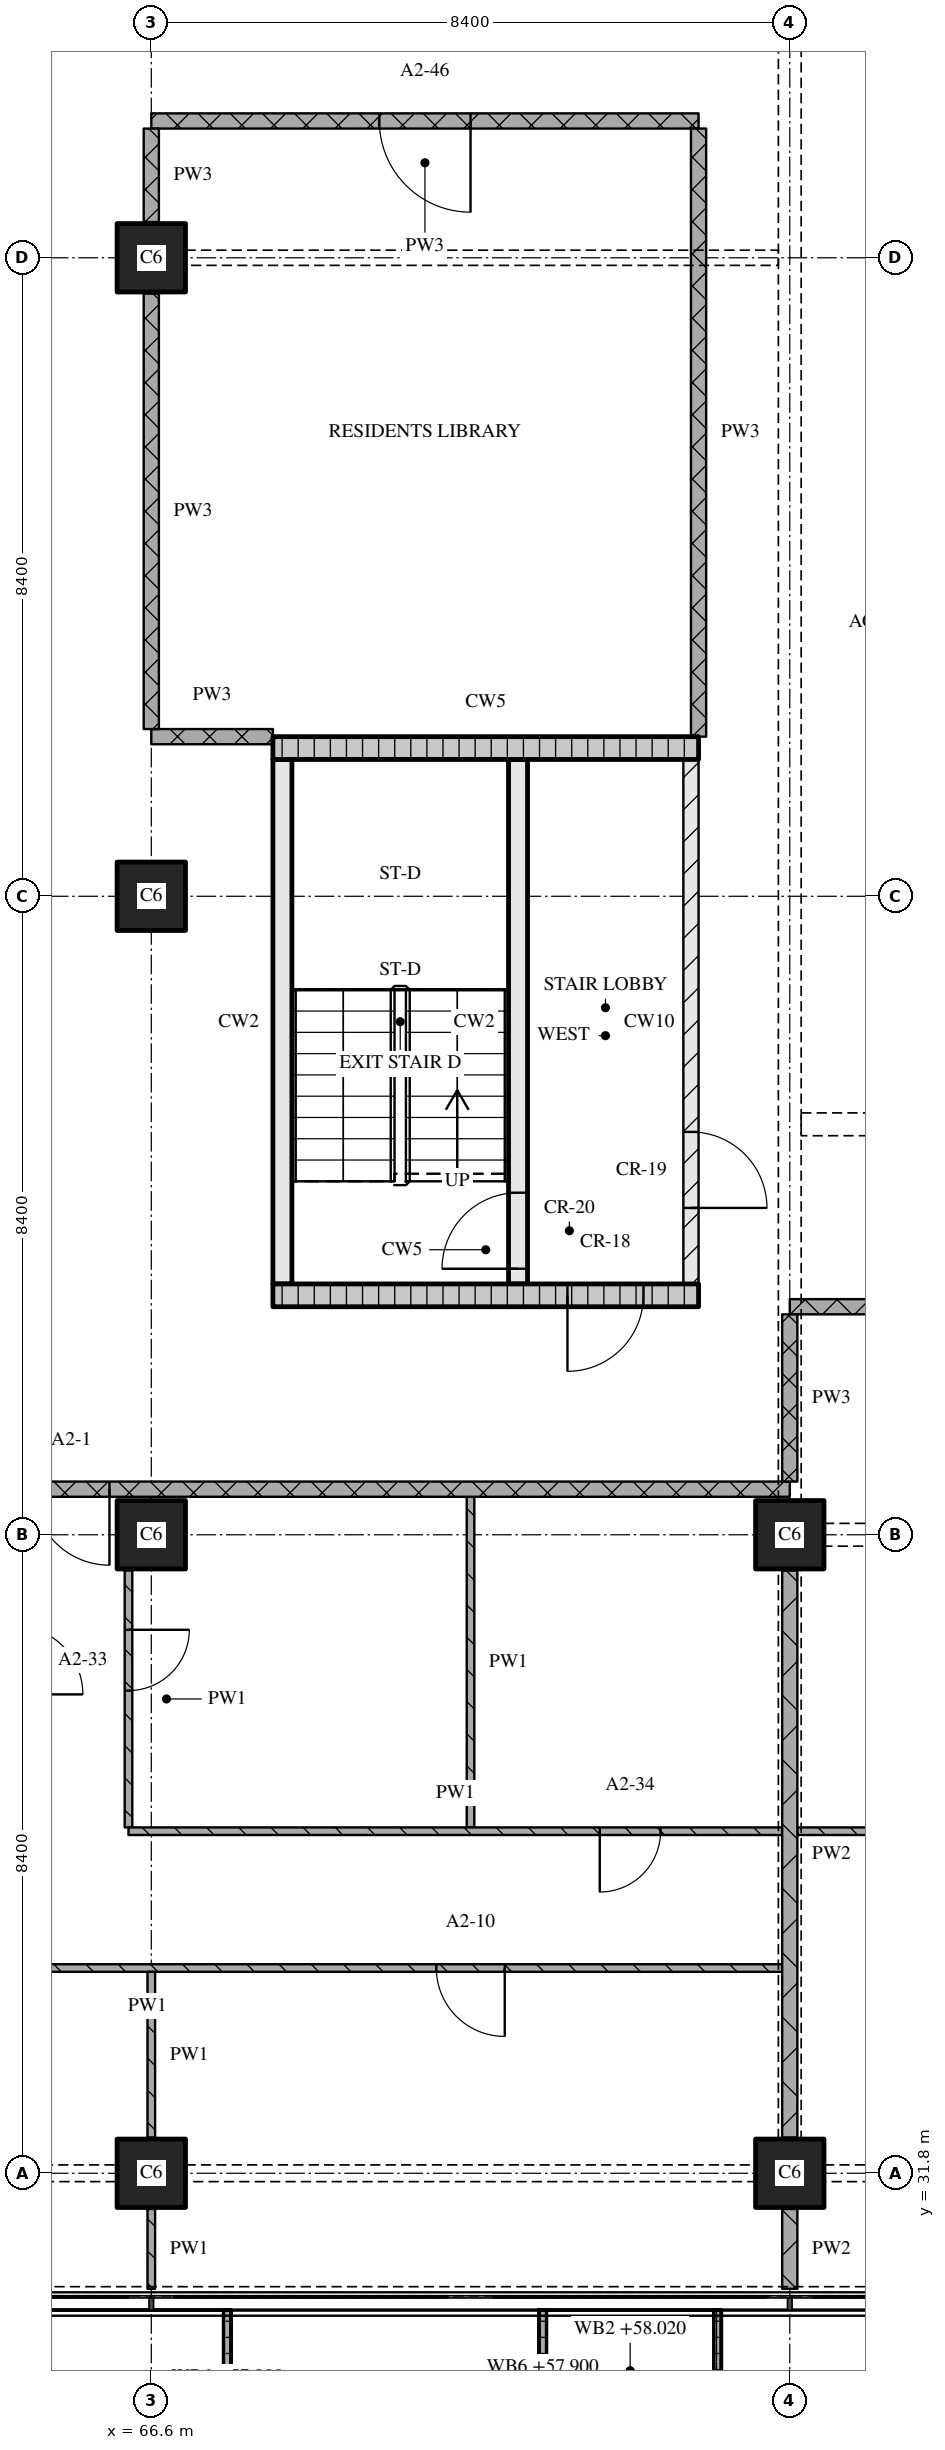
"""IFC4 building model, lengths in metres.
Left out: names, types, materials, properties, quantities, classifications, styles, units other than length and angle.
Written with IfcOpenShell. Run it as: python <this file> out.ifc"""

import sys

from ifc_helpers import new_model, si_unit, direction, frame, frame_2d, origin, origin_2d, place, context, subcontext, project, spatial, polyline, rectangle, outline, extrude, element, fill, save


model = new_model("IFC4")
c1 = context("Model", 3, precision=1e-05, world=origin(), true_north=direction((0.0, 1.0)))
c2 = subcontext(c1, "Body", "Model", "MODEL_VIEW")
j1 = project(units=[si_unit("LENGTHUNIT", "METRE"), si_unit("PLANEANGLEUNIT", "RADIAN")], contexts=[c1])
p1 = place(None, origin())
s1 = spatial("IfcSite", under=j1, at=p1, CompositionType="ELEMENT")
p2 = place(p1, origin())
s2 = spatial("IfcBuilding", under=s1, at=p2, CompositionType="ELEMENT")
p3 = place(p2, frame((0.0, 0.0, 55.2)))
s3 = spatial("IfcBuildingStorey", under=s2, at=p3, CompositionType="ELEMENT", Elevation=55.2)
for number, where, z_axis, x_axis in (
    (1, (66.6, 31.8, 0.0), (0.0, 0.0, 1.0), (1.0, 0.0, 0.0)),
    (2, (66.6, 40.2, 0.0), (0.0, 0.0, 1.0), (1.0, 0.0, 0.0)),
    (3, (66.6, 48.6, 0.0), (0.0, 0.0, 1.0), (1.0, 0.0, 0.0)),
    (4, (66.6, 57.0, 0.0), (0.0, 0.0, 1.0), (1.0, 0.0, 0.0)),
    (5, (75.0, 31.8, 0.0), (0.0, 0.0, 1.0), (1.0, 0.0, 0.0)),
    (6, (75.0, 40.2, 0.0), (0.0, 0.0, 1.0), (1.0, 0.0, 0.0)),
):
    element("IfcColumn", number, at=place(p3, frame(where, z_axis=z_axis, x_axis=x_axis)), inside=s3, PredefinedType="COLUMN", context=c2, shape_type="SweptSolid", body=[
        extrude(rectangle(XDim=0.9, YDim=0.9, at=origin_2d()), origin(), (0.0, 0.0, 1.0), 3.6),
    ])
p4 = place(p3, origin())
e7 = element("IfcWall", 7, at=p4, inside=s3, PredefinedType="SOLIDWALL", context=c2, shape_type="SweptSolid", body=[
    extrude(outline(polyline([(61.35, 30.0), (61.45, 30.0), (61.45, 28.233), (67.55, 28.233), (67.55, 30.0), (67.65, 30.0), (67.65, 28.133), (61.35, 28.133), (61.35, 30.0)])), origin(), (0.0, 0.0, 1.0), 1.0),
])
p5 = place(p3, origin())
e8 = element("IfcWall", 8, at=p5, inside=s3, PredefinedType="SOLIDWALL", context=c2, shape_type="SweptSolid", body=[
    extrude(outline(polyline([(71.7, 30.0), (71.8, 30.0), (71.8, 28.5), (74.0, 28.5), (74.0, 30.0), (74.1, 30.0), (74.1, 28.4), (71.7, 28.4), (71.7, 30.0)])), origin(), (0.0, 0.0, 1.0), 1.0),
])
p6 = place(p3, frame((68.2, 43.35, 0.0), z_axis=(0.0, 0.0, 1.0), x_axis=(1.0, 0.0, 0.0)))
e9 = element("IfcWall", 9, at=p6, inside=s3, PredefinedType="SOLIDWALL", context=c2, shape_type="SweptSolid", body=[
    extrude(rectangle(XDim=5.6, YDim=0.3, at=frame_2d((2.8, 0.0))), origin(), (0.0, 0.0, 1.0), 3.32),
])
p7 = place(p6, frame((3.875, 0.0, 0.0)))
e10 = element("IfcOpeningElement", 10, at=p7, cuts=e9, PredefinedType="OPENING", context=c2, shape_type="SweptSolid", body=[
    extrude(rectangle(XDim=1.0, YDim=2.1, at=frame_2d((0.5, 1.05))), frame((0.0, 0.16, 0.0), z_axis=(0.0, -1.0, 0.0), x_axis=(1.0, 0.0, 0.0)), (0.0, 0.0, 1.0), 0.32),
])
p8 = place(p3, frame((68.325, 43.5, 0.0), z_axis=(0.0, 0.0, 1.0), x_axis=(0.0, 1.0, 0.0)))
e11 = element("IfcWall", 11, at=p8, inside=s3, PredefinedType="SOLIDWALL", context=c2, shape_type="SweptSolid", body=[
    extrude(rectangle(XDim=6.9, YDim=0.25, at=frame_2d((3.45, 0.0))), origin(), (0.0, 0.0, 1.0), 3.32),
])
p9 = place(p3, frame((71.425, 43.5, 0.0), z_axis=(0.0, 0.0, 1.0), x_axis=(0.0, 1.0, 0.0)))
e12 = element("IfcWall", 12, at=p9, inside=s3, PredefinedType="SOLIDWALL", context=c2, shape_type="SweptSolid", body=[
    extrude(rectangle(XDim=6.9, YDim=0.25, at=frame_2d((3.45, 0.0))), origin(), (0.0, 0.0, 1.0), 3.32),
])
p10 = place(p9, frame((0.2, 0.0, 0.0)))
e13 = element("IfcOpeningElement", 13, at=p10, cuts=e12, PredefinedType="OPENING", context=c2, shape_type="SweptSolid", body=[
    extrude(rectangle(XDim=1.0, YDim=2.1, at=frame_2d((0.5, 1.05))), frame((0.0, 0.135, 0.0), z_axis=(0.0, -1.0, 0.0), x_axis=(1.0, 0.0, 0.0)), (0.0, 0.0, 1.0), 0.27),
])
p11 = place(p3, frame((73.7, 43.5, 0.0), z_axis=(0.0, 0.0, 1.0), x_axis=(0.0, 1.0, 0.0)))
e14 = element("IfcWall", 14, at=p11, inside=s3, PredefinedType="PARTITIONING", context=c2, shape_type="SweptSolid", body=[
    extrude(rectangle(XDim=6.9, YDim=0.2, at=frame_2d((3.45, 0.0))), origin(), (0.0, 0.0, 1.0), 3.32),
])
p12 = place(p11, frame((1.0, 0.0, 0.0)))
e15 = element("IfcOpeningElement", 15, at=p12, cuts=e14, PredefinedType="OPENING", context=c2, shape_type="SweptSolid", body=[
    extrude(rectangle(XDim=1.0, YDim=2.1, at=frame_2d((0.5, 1.05))), frame((0.0, 0.11, 0.0), z_axis=(0.0, -1.0, 0.0), x_axis=(1.0, 0.0, 0.0)), (0.0, 0.0, 1.0), 0.22),
])
p13 = place(p3, frame((68.2, 50.55, 0.0), z_axis=(0.0, 0.0, 1.0), x_axis=(1.0, 0.0, 0.0)))
e16 = element("IfcWall", 16, at=p13, inside=s3, PredefinedType="SOLIDWALL", context=c2, shape_type="SweptSolid", body=[
    extrude(rectangle(XDim=5.6, YDim=0.3, at=frame_2d((2.8, 0.0))), origin(), (0.0, 0.0, 1.0), 3.32),
])
p14 = place(p3, frame((74.9, 34.5, 0.0), z_axis=(0.0, 0.0, 1.0), x_axis=(-1.0, 0.0, 0.0)))
e17 = element("IfcWall", 17, at=p14, inside=s3, PredefinedType="PARTITIONING", context=c2, shape_type="SweptSolid", body=[
    extrude(rectangle(XDim=16.7, YDim=0.1, at=frame_2d((8.35, 0.0))), origin(), (0.0, 0.0, 1.0), 3.32),
])
p15 = place(p14, frame((3.65, 0.0, 0.0)))
e18 = element("IfcOpeningElement", 18, at=p15, cuts=e17, PredefinedType="OPENING", context=c2, shape_type="SweptSolid", body=[
    extrude(rectangle(XDim=0.9, YDim=2.1, at=frame_2d((0.45, 1.05))), frame((0.0, 0.06, 0.0), z_axis=(0.0, -1.0, 0.0), x_axis=(1.0, 0.0, 0.0)), (0.0, 0.0, 1.0), 0.12),
])
p16 = place(p14, frame((12.05, 0.0, 0.0)))
e19 = element("IfcOpeningElement", 19, at=p16, cuts=e17, PredefinedType="OPENING", context=c2, shape_type="SweptSolid", body=[
    extrude(rectangle(XDim=0.9, YDim=2.1, at=frame_2d((0.45, 1.05))), frame((0.0, 0.06, 0.0), z_axis=(0.0, -1.0, 0.0), x_axis=(1.0, 0.0, 0.0)), (0.0, 0.0, 1.0), 0.12),
])
p17 = place(p3, frame((75.0, 40.8, 0.0), z_axis=(0.0, 0.0, 1.0), x_axis=(-1.0, 0.0, 0.0)))
e20 = element("IfcWall", 20, at=p17, inside=s3, PredefinedType="PARTITIONING", context=c2, shape_type="SweptSolid", body=[
    extrude(rectangle(XDim=24.08, YDim=0.2, at=frame_2d((12.04, 0.0))), origin(), (0.0, 0.0, 1.0), 3.32),
])
p18 = place(p17, frame((8.95, 0.0, 0.0)))
e21 = element("IfcOpeningElement", 21, at=p18, cuts=e20, PredefinedType="OPENING", context=c2, shape_type="SweptSolid", body=[
    extrude(rectangle(XDim=1.0, YDim=2.1, at=frame_2d((0.5, 1.05))), frame((0.0, 0.11, 0.0), z_axis=(0.0, -1.0, 0.0), x_axis=(1.0, 0.0, 0.0)), (0.0, 0.0, 1.0), 0.22),
])
p19 = place(p3, frame((100.2, 43.2, 0.0), z_axis=(0.0, 0.0, 1.0), x_axis=(-1.0, 0.0, 0.0)))
e22 = element("IfcWall", 22, at=p19, inside=s3, PredefinedType="PARTITIONING", context=c2, shape_type="SweptSolid", body=[
    extrude(rectangle(XDim=25.2, YDim=0.2, at=frame_2d((12.6, 0.0))), origin(), (0.0, 0.0, 1.0), 3.32),
])
p20 = place(p19, frame((8.05, 0.0, 0.0)))
e23 = element("IfcOpeningElement", 23, at=p20, cuts=e22, PredefinedType="OPENING", context=c2, shape_type="SweptSolid", body=[
    extrude(rectangle(XDim=1.0, YDim=2.1, at=frame_2d((0.5, 1.05))), frame((0.0, 0.11, 0.0), z_axis=(0.0, -1.0, 0.0), x_axis=(1.0, 0.0, 0.0)), (0.0, 0.0, 1.0), 0.22),
])
p21 = place(p3, frame((66.6, 50.7, 0.0), z_axis=(0.0, 0.0, 1.0), x_axis=(1.0, 0.0, 0.0)))
e24 = element("IfcWall", 24, at=p21, inside=s3, PredefinedType="PARTITIONING", context=c2, shape_type="SweptSolid", body=[
    extrude(rectangle(XDim=1.6, YDim=0.2, at=frame_2d((0.8, 0.0))), origin(), (0.0, 0.0, 1.0), 3.32),
])
p22 = place(p3, frame((73.8, 58.8, 0.0), z_axis=(0.0, 0.0, 1.0), x_axis=(-1.0, 0.0, 0.0)))
e25 = element("IfcWall", 25, at=p22, inside=s3, PredefinedType="PARTITIONING", context=c2, shape_type="SweptSolid", body=[
    extrude(rectangle(XDim=7.2, YDim=0.2, at=frame_2d((3.6, 0.0))), origin(), (0.0, 0.0, 1.0), 3.32),
])
p23 = place(p22, frame((3.0, 0.0, 0.0)))
e26 = element("IfcOpeningElement", 26, at=p23, cuts=e25, PredefinedType="OPENING", context=c2, shape_type="SweptSolid", body=[
    extrude(rectangle(XDim=1.2, YDim=2.1, at=frame_2d((0.6, 1.05))), frame((0.0, 0.11, 0.0), z_axis=(0.0, -1.0, 0.0), x_axis=(1.0, 0.0, 0.0)), (0.0, 0.0, 1.0), 0.22),
])
p24 = place(p3, frame((66.3, 39.73, 0.0), z_axis=(0.0, 0.0, 1.0), x_axis=(0.0, -1.0, 0.0)))
e27 = element("IfcWall", 27, at=p24, inside=s3, PredefinedType="PARTITIONING", context=c2, shape_type="SweptSolid", body=[
    extrude(rectangle(XDim=3.38, YDim=0.1, at=frame_2d((1.69, 0.0))), origin(), (0.0, 0.0, 1.0), 3.32),
])
p25 = place(p24, frame((0.78, 0.0, 0.0)))
e28 = element("IfcOpeningElement", 28, at=p25, cuts=e27, PredefinedType="OPENING", context=c2, shape_type="SweptSolid", body=[
    extrude(rectangle(XDim=0.8, YDim=2.1, at=frame_2d((0.4, 1.05))), frame((0.0, 0.06, 0.0), z_axis=(0.0, -1.0, 0.0), x_axis=(1.0, 0.0, 0.0)), (0.0, 0.0, 1.0), 0.12),
])
p26 = place(p3, frame((66.6, 56.53, 0.0), z_axis=(0.0, 0.0, 1.0), x_axis=(0.0, -1.0, 0.0)))
e29 = element("IfcWall", 29, at=p26, inside=s3, PredefinedType="PARTITIONING", context=c2, shape_type="SweptSolid", body=[
    extrude(rectangle(XDim=5.73, YDim=0.2, at=frame_2d((2.865, 0.0))), origin(), (0.0, 0.0, 1.0), 3.32),
])
p27 = place(p3, frame((66.6, 58.7, 0.0), z_axis=(0.0, 0.0, 1.0), x_axis=(0.0, -1.0, 0.0)))
e30 = element("IfcWall", 30, at=p27, inside=s3, PredefinedType="PARTITIONING", context=c2, shape_type="SweptSolid", body=[
    extrude(rectangle(XDim=1.23, YDim=0.2, at=frame_2d((0.615, 0.0))), origin(), (0.0, 0.0, 1.0), 3.32),
])
p28 = place(p3, frame((66.6, 31.33, 0.0), z_axis=(0.0, 0.0, 1.0), x_axis=(0.0, -1.0, 0.0)))
e31 = element("IfcWall", 31, at=p28, inside=s3, PredefinedType="PARTITIONING", context=c2, shape_type="SweptSolid", body=[
    extrude(rectangle(XDim=1.05, YDim=0.1, at=frame_2d((0.525, 0.0))), origin(), (0.0, 0.0, 1.0), 3.32),
])
p29 = place(p3, frame((66.6, 34.45, 0.0), z_axis=(0.0, 0.0, 1.0), x_axis=(0.0, -1.0, 0.0)))
e32 = element("IfcWall", 32, at=p29, inside=s3, PredefinedType="PARTITIONING", context=c2, shape_type="SweptSolid", body=[
    extrude(rectangle(XDim=2.18, YDim=0.1, at=frame_2d((1.09, 0.0))), origin(), (0.0, 0.0, 1.0), 3.32),
])
p30 = place(p3, frame((70.8, 40.7, 0.0), z_axis=(0.0, 0.0, 1.0), x_axis=(0.0, -1.0, 0.0)))
e33 = element("IfcWall", 33, at=p30, inside=s3, PredefinedType="PARTITIONING", context=c2, shape_type="SweptSolid", body=[
    extrude(rectangle(XDim=4.35, YDim=0.1, at=frame_2d((2.175, 0.0))), origin(), (0.0, 0.0, 1.0), 3.32),
])
p31 = place(p3, frame((73.8, 58.7, 0.0), z_axis=(0.0, 0.0, 1.0), x_axis=(0.0, -1.0, 0.0)))
e34 = element("IfcWall", 34, at=p31, inside=s3, PredefinedType="PARTITIONING", context=c2, shape_type="SweptSolid", body=[
    extrude(rectangle(XDim=8.0, YDim=0.2, at=frame_2d((4.0, 0.0))), origin(), (0.0, 0.0, 1.0), 3.32),
])
p32 = place(p3, frame((75.0, 43.1, 0.0), z_axis=(0.0, 0.0, 1.0), x_axis=(0.0, -1.0, 0.0)))
e35 = element("IfcWall", 35, at=p32, inside=s3, PredefinedType="PARTITIONING", context=c2, shape_type="SweptSolid", body=[
    extrude(rectangle(XDim=2.2, YDim=0.2, at=frame_2d((1.1, 0.0))), origin(), (0.0, 0.0, 1.0), 2.43),
])
p33 = place(p3, frame((75.0, 31.33, 0.0), z_axis=(0.0, 0.0, 1.0), x_axis=(0.0, -1.0, 0.0)))
e36 = element("IfcWall", 36, at=p33, inside=s3, PredefinedType="PARTITIONING", context=c2, shape_type="SweptSolid", body=[
    extrude(rectangle(XDim=1.05, YDim=0.2, at=frame_2d((0.525, 0.0))), origin(), (0.0, 0.0, 1.0), 3.32),
])
p34 = place(p3, frame((75.0, 39.73, 0.0), z_axis=(0.0, 0.0, 1.0), x_axis=(0.0, -1.0, 0.0)))
e37 = element("IfcWall", 37, at=p34, inside=s3, PredefinedType="PARTITIONING", context=c2, shape_type="SweptSolid", body=[
    extrude(rectangle(XDim=7.46, YDim=0.2, at=frame_2d((3.73, 0.0))), origin(), (0.0, 0.0, 1.0), 2.83),
])
p35 = place(p3, frame((66.3, 36.3, 0.0), z_axis=(0.0, 0.0, 1.0), x_axis=(1.0, 0.0, 0.0)))
e38 = element("IfcWall", 38, at=p35, inside=s3, PredefinedType="PARTITIONING", context=c2, shape_type="SweptSolid", body=[
    extrude(rectangle(XDim=8.6, YDim=0.1, at=frame_2d((4.3, 0.0))), origin(), (0.0, 0.0, 1.0), 3.32),
])
p36 = place(p35, frame((6.2, 0.0, 0.0)))
e39 = element("IfcOpeningElement", 39, at=p36, cuts=e38, PredefinedType="OPENING", context=c2, shape_type="SweptSolid", body=[
    extrude(rectangle(XDim=0.8, YDim=2.1, at=frame_2d((0.4, 1.05))), frame((0.0, 0.06, 0.0), z_axis=(0.0, -1.0, 0.0), x_axis=(1.0, 0.0, 0.0)), (0.0, 0.0, 1.0), 0.12),
])
p37 = place(p3, frame((75.1, 36.3, 0.0), z_axis=(0.0, 0.0, 1.0), x_axis=(1.0, 0.0, 0.0)))
e40 = element("IfcWall", 40, at=p37, inside=s3, PredefinedType="PARTITIONING", context=c2, shape_type="SweptSolid", body=[
    extrude(rectangle(XDim=8.3, YDim=0.1, at=frame_2d((4.15, 0.0))), origin(), (0.0, 0.0, 1.0), 3.32),
])
p38 = place(p7, origin())
e41 = element("IfcDoor", 41, at=p38, inside=s3, OperationType="SINGLE_SWING_RIGHT", PredefinedType="DOOR", context=c2, shape_type="SweptSolid", body=[
    extrude(rectangle(XDim=1.0, YDim=2.1, at=frame_2d((0.5, 1.05))), frame((0.0, 0.025, 0.0), z_axis=(0.0, -1.0, 0.0), x_axis=(1.0, 0.0, 0.0)), (0.0, 0.0, 1.0), 0.05),
])
fill(e10, e41)
p39 = place(p10, origin())
e42 = element("IfcDoor", 42, at=p39, inside=s3, OperationType="SINGLE_SWING_LEFT", PredefinedType="DOOR", context=c2, shape_type="SweptSolid", body=[
    extrude(rectangle(XDim=1.0, YDim=2.1, at=frame_2d((0.5, 1.05))), frame((0.0, 0.025, 0.0), z_axis=(0.0, -1.0, 0.0), x_axis=(1.0, 0.0, 0.0)), (0.0, 0.0, 1.0), 0.05),
])
fill(e13, e42)
p40 = place(p12, origin())
e43 = element("IfcDoor", 43, at=p40, inside=s3, OperationType="SINGLE_SWING_RIGHT", PredefinedType="DOOR", context=c2, shape_type="SweptSolid", body=[
    extrude(rectangle(XDim=1.0, YDim=2.1, at=frame_2d((0.5, 1.05))), frame((0.0, 0.025, 0.0), z_axis=(0.0, -1.0, 0.0), x_axis=(1.0, 0.0, 0.0)), (0.0, 0.0, 1.0), 0.05),
])
fill(e15, e43)
p41 = place(p15, origin())
e44 = element("IfcDoor", 44, at=p41, inside=s3, OperationType="SINGLE_SWING_LEFT", PredefinedType="DOOR", context=c2, shape_type="SweptSolid", body=[
    extrude(rectangle(XDim=0.9, YDim=2.1, at=frame_2d((0.45, 1.05))), frame((0.0, 0.025, 0.0), z_axis=(0.0, -1.0, 0.0), x_axis=(1.0, 0.0, 0.0)), (0.0, 0.0, 1.0), 0.05),
])
fill(e18, e44)
p42 = place(p18, origin())
e45 = element("IfcDoor", 45, at=p42, inside=s3, OperationType="SINGLE_SWING_LEFT", PredefinedType="DOOR", context=c2, shape_type="SweptSolid", body=[
    extrude(rectangle(XDim=1.0, YDim=2.1, at=frame_2d((0.5, 1.05))), frame((0.0, 0.025, 0.0), z_axis=(0.0, -1.0, 0.0), x_axis=(1.0, 0.0, 0.0)), (0.0, 0.0, 1.0), 0.05),
])
fill(e21, e45)
p43 = place(p23, origin())
e46 = element("IfcDoor", 46, at=p43, inside=s3, OperationType="SINGLE_SWING_LEFT", PredefinedType="DOOR", context=c2, shape_type="SweptSolid", body=[
    extrude(rectangle(XDim=1.2, YDim=2.1, at=frame_2d((0.6, 1.05))), frame((0.0, 0.025, 0.0), z_axis=(0.0, -1.0, 0.0), x_axis=(1.0, 0.0, 0.0)), (0.0, 0.0, 1.0), 0.05),
])
fill(e26, e46)
p44 = place(p25, origin())
e47 = element("IfcDoor", 47, at=p44, inside=s3, OperationType="SINGLE_SWING_LEFT", PredefinedType="DOOR", context=c2, shape_type="SweptSolid", body=[
    extrude(rectangle(XDim=0.8, YDim=2.1, at=frame_2d((0.4, 1.05))), frame((0.0, 0.025, 0.0), z_axis=(0.0, -1.0, 0.0), x_axis=(1.0, 0.0, 0.0)), (0.0, 0.0, 1.0), 0.05),
])
fill(e28, e47)
p45 = place(p36, origin())
e48 = element("IfcDoor", 48, at=p45, inside=s3, OperationType="SINGLE_SWING_RIGHT", PredefinedType="DOOR", context=c2, shape_type="SweptSolid", body=[
    extrude(rectangle(XDim=0.8, YDim=2.1, at=frame_2d((0.4, 1.05))), frame((0.0, 0.025, 0.0), z_axis=(0.0, -1.0, 0.0), x_axis=(1.0, 0.0, 0.0)), (0.0, 0.0, 1.0), 0.05),
])
fill(e39, e48)
save(model, sys.argv[1])
